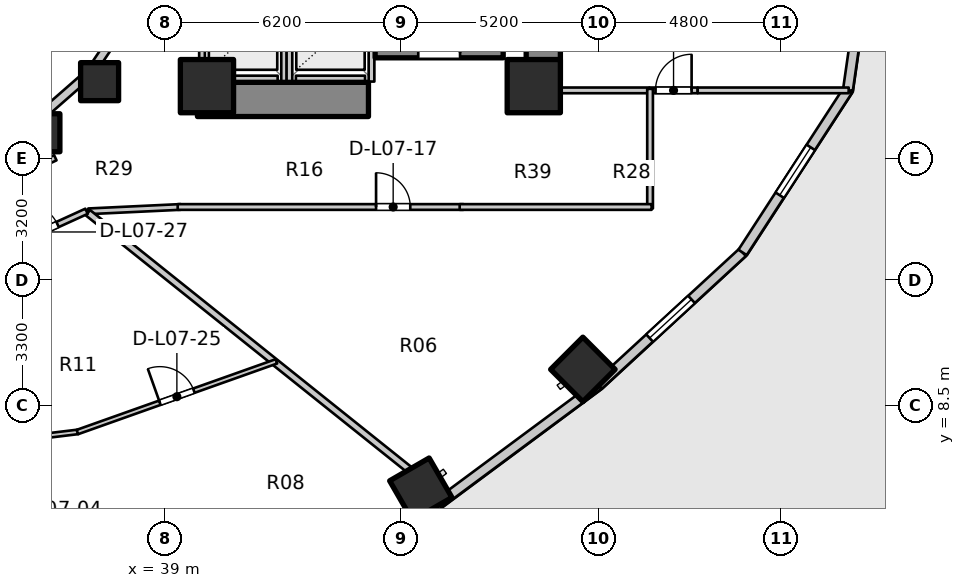
"""IFC4 building model, lengths in metres.
Left out: names, types, materials, properties, quantities, classifications, styles, units other than length and angle.
Written with IfcOpenShell. Run it as: python <this file> out.ifc"""

import sys

from ifc_helpers import new_model, si_unit, direction, frame, frame_2d, origin, origin_2d, place, context, subcontext, project, spatial, rectangle, extrude, element, fill, save


model = new_model("IFC4")
c1 = context("Model", 3, precision=1e-05, world=origin(), true_north=direction((0.0, 1.0)))
c2 = subcontext(c1, "Body", "Model", "MODEL_VIEW")
j1 = project(units=[si_unit("LENGTHUNIT", "METRE"), si_unit("PLANEANGLEUNIT", "RADIAN")], contexts=[c1])
p1 = place(None, origin())
s1 = spatial("IfcSite", under=j1, at=p1, CompositionType="ELEMENT")
p2 = place(p1, origin())
s2 = spatial("IfcBuilding", under=s1, at=p2, CompositionType="ELEMENT")
p3 = place(p2, frame((0.0, 0.0, 27.6)))
s3 = spatial("IfcBuildingStorey", under=s2, at=p3, CompositionType="ELEMENT", Elevation=27.6)
p4 = place(p3, frame((48.95, 17.05, 0.0), z_axis=(0.0, 0.0, 1.0), x_axis=(0.0, 1.0, 0.0)))
e1 = element("IfcWall", 1, at=p4, inside=s3, PredefinedType="SHEAR", context=c2, shape_type="SweptSolid", body=[
    extrude(rectangle(XDim=12.8, YDim=0.9, at=frame_2d((6.4, 0.0))), origin(), (0.0, 0.0, 1.0), 3.1),
])
p5 = place(p3, frame((39.85, 16.55, 0.0), z_axis=(0.0, 0.0, 1.0), x_axis=(1.0, 0.0, 0.0)))
e2 = element("IfcWall", 2, at=p5, inside=s3, PredefinedType="SHEAR", context=c2, shape_type="SweptSolid", body=[
    extrude(rectangle(XDim=4.5, YDim=0.9, at=frame_2d((2.25, 0.0))), origin(), (0.0, 0.0, 1.0), 3.1),
])
p6 = place(p3, frame((44.525, 17.77, 0.0), z_axis=(0.0, 0.0, 1.0), x_axis=(1.0, 0.0, 0.0)))
e3 = element("IfcWall", 3, at=p6, inside=s3, PredefinedType="SOLIDWALL", context=c2, shape_type="SweptSolid", body=[
    extrude(rectangle(XDim=3.37, YDim=0.25, at=frame_2d((1.685, 0.0))), origin(), (0.0, 0.0, 1.0), 3.1),
])
p7 = place(p6, frame((1.135, 0.0, 0.0)))
e4 = element("IfcOpeningElement", 4, at=p7, cuts=e3, PredefinedType="OPENING", context=c2, shape_type="SweptSolid", body=[
    extrude(rectangle(XDim=1.1, YDim=2.1, at=frame_2d((0.55, 1.05))), frame((0.0, 0.135, 0.0), z_axis=(0.0, -1.0, 0.0), x_axis=(1.0, 0.0, 0.0)), (0.0, 0.0, 1.0), 0.27),
])
for number, where, z_axis, x_axis in (
    (5, (40.1, 16.9, 0.0), (0.0, 0.0, 1.0), (1.0, 0.0, 0.0)),
    (6, (48.7, 16.9, 0.0), (0.0, 0.0, 1.0), (1.0, 0.0, 0.0)),
):
    element("IfcColumn", number, at=place(p3, frame(where, z_axis=z_axis, x_axis=x_axis)), inside=s3, PredefinedType="COLUMN", context=c2, shape_type="SweptSolid", body=[
        extrude(rectangle(XDim=1.4, YDim=1.4, at=origin_2d()), origin(), (0.0, 0.0, 1.0), 3.1),
    ])
p8 = place(p3, frame((35.73, 15.673, 0.0), z_axis=(0.0, 0.0, 1.0), x_axis=(1.0, 0.0, 0.0)))
e7 = element("IfcColumn", 7, at=p8, inside=s3, PredefinedType="COLUMN", context=c2, shape_type="SweptSolid", body=[
    extrude(rectangle(XDim=1.0, YDim=1.0, at=origin_2d()), origin(), (0.0, 0.0, 1.0), 3.1),
])
p9 = place(p3, frame((45.727, 6.296, 0.0), z_axis=(0.0, 0.0, 1.0), x_axis=(0.5, -0.866025403784, 0.0)))
e8 = element("IfcColumn", 8, at=p9, inside=s3, PredefinedType="COLUMN", context=c2, shape_type="SweptSolid", body=[
    extrude(rectangle(XDim=1.2, YDim=1.2, at=origin_2d()), origin(), (0.0, 0.0, 1.0), 3.1),
])
p10 = place(p3, frame((37.275, 17.018, 0.0), z_axis=(0.0, 0.0, 1.0), x_axis=(1.0, 0.0, 0.0)))
e9 = element("IfcColumn", 9, at=p10, inside=s3, PredefinedType="COLUMN", context=c2, shape_type="SweptSolid", body=[
    extrude(rectangle(XDim=1.0, YDim=1.0, at=origin_2d()), origin(), (0.0, 0.0, 1.0), 3.1),
])
p11 = place(p3, frame((49.992, 9.446, 0.0), z_axis=(0.0, 0.0, 1.0), x_axis=(0.707106781187, -0.707106781187, 0.0)))
e10 = element("IfcColumn", 10, at=p11, inside=s3, PredefinedType="COLUMN", context=c2, shape_type="SweptSolid", body=[
    extrude(rectangle(XDim=1.2, YDim=1.2, at=origin_2d()), origin(), (0.0, 0.0, 1.0), 3.1),
])
p12 = place(p3, frame((35.56, 15.968, 0.0), z_axis=(0.0, 0.0, 1.0), x_axis=(0.752576694707, 0.658504607869, 0.0)))
e11 = element("IfcWall", 11, at=p12, inside=s3, PredefinedType="STANDARD", context=c2, shape_type="SweptSolid", body=[
    extrude(rectangle(XDim=1.959, YDim=0.23, at=frame_2d((0.98, 0.0))), origin(), (0.0, 0.0, 1.0), 2.16),
])
p13 = place(p3, frame((37.035, 17.258, 0.0), z_axis=(0.0, 0.0, 1.0), x_axis=(0.558197800898, 0.829707909492, 0.0)))
e12 = element("IfcWall", 12, at=p13, inside=s3, PredefinedType="STANDARD", context=c2, shape_type="SweptSolid", body=[
    extrude(rectangle(XDim=2.027, YDim=0.23, at=frame_2d((1.013, 0.0))), origin(), (0.0, 0.0, 1.0), 2.16),
])
p14 = place(p3, frame((40.332, 3.364, 0.0), z_axis=(0.0, 0.0, 1.0), x_axis=(0.919612132394, 0.39282760335, 0.0)))
e13 = element("IfcWall", 13, at=p14, inside=s3, PredefinedType="STANDARD", context=c2, shape_type="SweptSolid", body=[
    extrude(rectangle(XDim=6.209, YDim=0.26, at=frame_2d((3.105, 0.0))), origin(), (0.0, 0.0, 1.0), 2.85),
])
p15 = place(p14, frame((2.355, 0.0, 0.75)))
e14 = element("IfcOpeningElement", 14, at=p15, cuts=e13, PredefinedType="OPENING", context=c2, shape_type="SweptSolid", body=[
    extrude(rectangle(XDim=1.5, YDim=1.6, at=frame_2d((0.75, 0.8))), frame((0.0, 0.14, 0.0), z_axis=(0.0, -1.0, 0.0), x_axis=(1.0, 0.0, 0.0)), (0.0, 0.0, 1.0), 0.28),
])
p16 = place(p3, frame((46.042, 5.803, 0.0), z_axis=(0.0, 0.0, 1.0), x_axis=(0.803477531792, 0.595335078679, 0.0)))
e15 = element("IfcWall", 15, at=p16, inside=s3, PredefinedType="STANDARD", context=c2, shape_type="SweptSolid", body=[
    extrude(rectangle(XDim=5.43, YDim=0.26, at=frame_2d((2.715, 0.0))), origin(), (0.0, 0.0, 1.0), 2.85),
])
p17 = place(p3, frame((50.405, 9.035, 0.0), z_axis=(0.0, 0.0, 1.0), x_axis=(0.735655109293, 0.67735630223, 0.0)))
e16 = element("IfcWall", 16, at=p17, inside=s3, PredefinedType="STANDARD", context=c2, shape_type="SweptSolid", body=[
    extrude(rectangle(XDim=5.151, YDim=0.26, at=frame_2d((2.575, 0.0))), origin(), (0.0, 0.0, 1.0), 2.85),
])
p18 = place(p17, frame((1.825, 0.0, 0.75)))
e17 = element("IfcOpeningElement", 17, at=p18, cuts=e16, PredefinedType="OPENING", context=c2, shape_type="SweptSolid", body=[
    extrude(rectangle(XDim=1.5, YDim=1.6, at=frame_2d((0.75, 0.8))), frame((0.0, 0.14, 0.0), z_axis=(0.0, -1.0, 0.0), x_axis=(1.0, 0.0, 0.0)), (0.0, 0.0, 1.0), 0.28),
])
p19 = place(p3, frame((54.194, 12.524, 0.0), z_axis=(0.0, 0.0, 1.0), x_axis=(0.544578722263, 0.838709732421, 0.0)))
e18 = element("IfcWall", 18, at=p19, inside=s3, PredefinedType="STANDARD", context=c2, shape_type="SweptSolid", body=[
    extrude(rectangle(XDim=5.092, YDim=0.26, at=frame_2d((2.546, 0.0))), origin(), (0.0, 0.0, 1.0), 2.85),
])
p20 = place(p19, frame((1.796, 0.0, 0.75)))
e19 = element("IfcOpeningElement", 19, at=p20, cuts=e18, PredefinedType="OPENING", context=c2, shape_type="SweptSolid", body=[
    extrude(rectangle(XDim=1.5, YDim=1.6, at=frame_2d((0.75, 0.8))), frame((0.0, 0.14, 0.0), z_axis=(0.0, -1.0, 0.0), x_axis=(1.0, 0.0, 0.0)), (0.0, 0.0, 1.0), 0.28),
])
p21 = place(p3, frame((56.967, 16.795, 0.0), z_axis=(0.0, 0.0, 1.0), x_axis=(0.142528001686, 0.989790770181, 0.0)))
e20 = element("IfcWall", 20, at=p21, inside=s3, PredefinedType="STANDARD", context=c2, shape_type="SweptSolid", body=[
    extrude(rectangle(XDim=6.269, YDim=0.26, at=frame_2d((3.135, 0.0))), origin(), (0.0, 0.0, 1.0), 2.85),
])
p22 = place(p21, frame((1.935, 0.0, 0.75)))
e21 = element("IfcOpeningElement", 21, at=p22, cuts=e20, PredefinedType="OPENING", context=c2, shape_type="SweptSolid", body=[
    extrude(rectangle(XDim=2.4, YDim=1.7, at=frame_2d((1.2, 0.85))), frame((0.0, 0.14, 0.0), z_axis=(0.0, -1.0, 0.0), x_axis=(1.0, 0.0, 0.0)), (0.0, 0.0, 1.0), 0.28),
])
p23 = place(p3, frame((40.14, 17.1, 0.0), z_axis=(0.0, 0.0, 1.0), x_axis=(1.0, 0.0, 0.0)))
e22 = element("IfcWall", 22, at=p23, inside=s3, PredefinedType="SOLIDWALL", context=c2, shape_type="SweptSolid", body=[
    extrude(rectangle(XDim=1.82, YDim=0.15, at=frame_2d((0.91, 0.0))), origin(), (0.0, 0.0, 1.0), 2.12),
])
p24 = place(p3, frame((39.97, 17.02, 0.0), z_axis=(0.0, 0.0, 1.0), x_axis=(0.0, 1.0, 0.0)))
e23 = element("IfcWall", 23, at=p24, inside=s3, PredefinedType="SOLIDWALL", context=c2, shape_type="SweptSolid", body=[
    extrude(rectangle(XDim=2.22, YDim=0.15, at=frame_2d((1.11, 0.0))), origin(), (0.0, 0.0, 1.0), 2.12),
])
p25 = place(p3, frame((42.13, 17.02, 0.0), z_axis=(0.0, 0.0, 1.0), x_axis=(0.0, 1.0, 0.0)))
e24 = element("IfcWall", 24, at=p25, inside=s3, PredefinedType="SOLIDWALL", context=c2, shape_type="SweptSolid", body=[
    extrude(rectangle(XDim=2.22, YDim=0.15, at=frame_2d((1.11, 0.0))), origin(), (0.0, 0.0, 1.0), 2.855),
])
p26 = place(p3, frame((42.44, 17.1, 0.0), z_axis=(0.0, 0.0, 1.0), x_axis=(1.0, 0.0, 0.0)))
e25 = element("IfcWall", 25, at=p26, inside=s3, PredefinedType="SOLIDWALL", context=c2, shape_type="SweptSolid", body=[
    extrude(rectangle(XDim=1.82, YDim=0.15, at=frame_2d((0.91, 0.0))), origin(), (0.0, 0.0, 1.0), 2.855),
])
p27 = place(p3, frame((42.27, 17.02, 0.0), z_axis=(0.0, 0.0, 1.0), x_axis=(0.0, 1.0, 0.0)))
e26 = element("IfcWall", 26, at=p27, inside=s3, PredefinedType="SOLIDWALL", context=c2, shape_type="SweptSolid", body=[
    extrude(rectangle(XDim=2.22, YDim=0.15, at=frame_2d((1.11, 0.0))), origin(), (0.0, 0.0, 1.0), 2.855),
])
p28 = place(p3, frame((44.43, 17.02, 0.0), z_axis=(0.0, 0.0, 1.0), x_axis=(0.0, 1.0, 0.0)))
e27 = element("IfcWall", 27, at=p28, inside=s3, PredefinedType="SOLIDWALL", context=c2, shape_type="SweptSolid", body=[
    extrude(rectangle(XDim=2.22, YDim=0.15, at=frame_2d((1.11, 0.0))), origin(), (0.0, 0.0, 1.0), 2.12),
])
p29 = place(p3, frame((34.127, 14.094, 0.0), z_axis=(0.0, 0.0, 1.0), x_axis=(0.906943449489, 0.421252393975, 0.0)))
e28 = element("IfcWall", 28, at=p29, inside=s3, PredefinedType="PARTITIONING", context=c2, shape_type="SweptSolid", body=[
    extrude(rectangle(XDim=2.186, YDim=0.15, at=frame_2d((1.093, 0.0))), origin(), (0.0, 0.0, 1.0), 2.237),
])
p30 = place(p3, frame((48.95, 16.788, 0.0), z_axis=(0.0, 0.0, 1.0), x_axis=(1.0, 0.0, 0.0)))
e29 = element("IfcWall", 29, at=p30, inside=s3, PredefinedType="PARTITIONING", context=c2, shape_type="SweptSolid", body=[
    extrude(rectangle(XDim=2.793, YDim=0.15, at=frame_2d((1.396, 0.0))), origin(), (0.0, 0.0, 1.0), 2.069),
])
p31 = place(p3, frame((51.743, 16.788, 0.0), z_axis=(0.0, 0.0, 1.0), x_axis=(1.0, 0.0, 0.0)))
e30 = element("IfcWall", 30, at=p31, inside=s3, PredefinedType="PARTITIONING", context=c2, shape_type="SweptSolid", body=[
    extrude(rectangle(XDim=1.27, YDim=0.15, at=frame_2d((0.635, 0.0))), origin(), (0.0, 0.0, 1.0), 2.855),
])
p32 = place(p31, frame((0.16, 0.0, 0.0)))
e31 = element("IfcOpeningElement", 31, at=p32, cuts=e30, PredefinedType="OPENING", context=c2, shape_type="SweptSolid", body=[
    extrude(rectangle(XDim=0.95, YDim=2.1, at=frame_2d((0.475, 1.05))), frame((0.0, 0.085, 0.0), z_axis=(0.0, -1.0, 0.0), x_axis=(1.0, 0.0, 0.0)), (0.0, 0.0, 1.0), 0.17),
])
p33 = place(p3, frame((53.013, 16.788, 0.0), z_axis=(0.0, 0.0, 1.0), x_axis=(1.0, 0.0, 0.0)))
e32 = element("IfcWall", 32, at=p33, inside=s3, PredefinedType="PARTITIONING", context=c2, shape_type="SweptSolid", body=[
    extrude(rectangle(XDim=3.973, YDim=0.15, at=frame_2d((1.987, 0.0))), origin(), (0.0, 0.0, 1.0), 2.855),
])
p34 = place(p3, frame((51.76, 13.68, 0.0), z_axis=(0.0, 0.0, 1.0), x_axis=(0.0, 1.0, 0.0)))
e33 = element("IfcWall", 33, at=p34, inside=s3, PredefinedType="PARTITIONING", context=c2, shape_type="SweptSolid", body=[
    extrude(rectangle(XDim=3.148, YDim=0.15, at=frame_2d((1.574, 0.0))), origin(), (0.0, 0.0, 1.0), 2.855),
])
p35 = place(p3, frame((36.98, 13.606, 0.0), z_axis=(0.0, 0.0, 1.0), x_axis=(0.998877427952, 0.047369651964, 0.0)))
e34 = element("IfcWall", 34, at=p35, inside=s3, PredefinedType="PARTITIONING", context=c2, shape_type="SweptSolid", body=[
    extrude(rectangle(XDim=2.433, YDim=0.15, at=frame_2d((1.216, 0.0))), origin(), (0.0, 0.0, 1.0), 2.237),
])
p36 = place(p3, frame((39.33, 13.72, 0.0), z_axis=(0.0, 0.0, 1.0), x_axis=(1.0, 0.0, 0.0)))
e35 = element("IfcWall", 35, at=p36, inside=s3, PredefinedType="PARTITIONING", context=c2, shape_type="SweptSolid", body=[
    extrude(rectangle(XDim=7.52, YDim=0.15, at=frame_2d((3.76, 0.0))), origin(), (0.0, 0.0, 1.0), 2.237),
])
p37 = place(p36, frame((5.22, 0.0, 0.0)))
e36 = element("IfcOpeningElement", 36, at=p37, cuts=e35, PredefinedType="OPENING", context=c2, shape_type="SweptSolid", body=[
    extrude(rectangle(XDim=0.9, YDim=2.1, at=frame_2d((0.45, 1.05))), frame((0.0, 0.085, 0.0), z_axis=(0.0, -1.0, 0.0), x_axis=(1.0, 0.0, 0.0)), (0.0, 0.0, 1.0), 0.17),
])
p38 = place(p3, frame((46.75, 13.72, 0.0), z_axis=(0.0, 0.0, 1.0), x_axis=(1.0, 0.0, 0.0)))
e37 = element("IfcWall", 37, at=p38, inside=s3, PredefinedType="PARTITIONING", context=c2, shape_type="SweptSolid", body=[
    extrude(rectangle(XDim=5.05, YDim=0.15, at=frame_2d((2.525, 0.0))), origin(), (0.0, 0.0, 1.0), 2.069),
])
p39 = place(p3, frame((36.968, 13.569, 0.0), z_axis=(0.0, 0.0, 1.0), x_axis=(0.781055486744, -0.624461629428, 0.0)))
e38 = element("IfcWall", 38, at=p39, inside=s3, PredefinedType="PARTITIONING", context=c2, shape_type="SweptSolid", body=[
    extrude(rectangle(XDim=10.843, YDim=0.18, at=frame_2d((5.422, 0.0))), origin(), (0.0, 0.0, 1.0), 2.237),
])
p40 = place(p3, frame((31.95, 7.225, 0.0), z_axis=(0.0, 0.0, 1.0), x_axis=(0.992699076447, 0.120617343785, 0.0)))
e39 = element("IfcWall", 39, at=p40, inside=s3, PredefinedType="MOVABLE", context=c2, shape_type="SweptSolid", body=[
    extrude(rectangle(XDim=4.793, YDim=0.12, at=frame_2d((2.396, 0.0))), origin(), (0.0, 0.0, 1.0), 2.237),
])
p41 = place(p3, frame((36.689, 7.798, 0.0), z_axis=(0.0, 0.0, 1.0), x_axis=(0.942369240096, 0.334574678243, 0.0)))
e40 = element("IfcWall", 40, at=p41, inside=s3, PredefinedType="MOVABLE", context=c2, shape_type="SweptSolid", body=[
    extrude(rectangle(XDim=5.559, YDim=0.12, at=frame_2d((2.779, 0.0))), origin(), (0.0, 0.0, 1.0), 2.237),
])
p42 = place(p41, frame((2.304, 0.0, 0.0)))
e41 = element("IfcOpeningElement", 41, at=p42, cuts=e40, PredefinedType="OPENING", context=c2, shape_type="SweptSolid", body=[
    extrude(rectangle(XDim=0.95, YDim=2.1, at=frame_2d((0.475, 1.05))), frame((0.0, 0.07, 0.0), z_axis=(0.0, -1.0, 0.0), x_axis=(1.0, 0.0, 0.0)), (0.0, 0.0, 1.0), 0.14),
])
p43 = place(p3, frame((34.543, 12.518, 0.0), z_axis=(0.0, 0.0, 1.0), x_axis=(0.909747571199, 0.415161843982, 0.0)))
e42 = element("IfcWall", 42, at=p43, inside=s3, PredefinedType="PARTITIONING", context=c2, shape_type="SweptSolid", body=[
    extrude(rectangle(XDim=2.625, YDim=0.15, at=frame_2d((1.312, 0.0))), origin(), (0.0, 0.0, 1.0), 2.237),
])
p44 = place(p43, frame((0.838, 0.0, 0.0)))
e43 = element("IfcOpeningElement", 43, at=p44, cuts=e42, PredefinedType="OPENING", context=c2, shape_type="SweptSolid", body=[
    extrude(rectangle(XDim=0.95, YDim=2.1, at=frame_2d((0.475, 1.05))), frame((0.0, 0.085, 0.0), z_axis=(0.0, -1.0, 0.0), x_axis=(1.0, 0.0, 0.0)), (0.0, 0.0, 1.0), 0.17),
])
p45 = place(p18, origin())
e44 = element("IfcWindow", 44, at=p45, inside=s3, PartitioningType="SINGLE_PANEL", PredefinedType="WINDOW", context=c2, shape_type="SweptSolid", body=[
    extrude(rectangle(XDim=1.5, YDim=1.6, at=frame_2d((0.75, 0.8))), frame((0.0, 0.03, 0.0), z_axis=(0.0, -1.0, 0.0), x_axis=(1.0, 0.0, 0.0)), (0.0, 0.0, 1.0), 0.06),
])
fill(e17, e44)
p46 = place(p20, origin())
e45 = element("IfcWindow", 45, at=p46, inside=s3, PartitioningType="SINGLE_PANEL", PredefinedType="WINDOW", context=c2, shape_type="SweptSolid", body=[
    extrude(rectangle(XDim=1.5, YDim=1.6, at=frame_2d((0.75, 0.8))), frame((0.0, 0.03, 0.0), z_axis=(0.0, -1.0, 0.0), x_axis=(1.0, 0.0, 0.0)), (0.0, 0.0, 1.0), 0.06),
])
fill(e19, e45)
p47 = place(p7, origin())
e46 = element("IfcDoor", 46, at=p47, inside=s3, OperationType="SINGLE_SWING_RIGHT", PredefinedType="DOOR", context=c2, shape_type="SweptSolid", body=[
    extrude(rectangle(XDim=1.1, YDim=2.1, at=frame_2d((0.55, 1.05))), frame((0.0, 0.025, 0.0), z_axis=(0.0, -1.0, 0.0), x_axis=(1.0, 0.0, 0.0)), (0.0, 0.0, 1.0), 0.05),
])
fill(e4, e46)
p48 = place(p32, origin())
e47 = element("IfcDoor", 47, at=p48, inside=s3, OperationType="SINGLE_SWING_RIGHT", PredefinedType="DOOR", context=c2, shape_type="SweptSolid", body=[
    extrude(rectangle(XDim=0.95, YDim=2.1, at=frame_2d((0.475, 1.05))), frame((0.0, 0.025, 0.0), z_axis=(0.0, -1.0, 0.0), x_axis=(1.0, 0.0, 0.0)), (0.0, 0.0, 1.0), 0.05),
])
fill(e31, e47)
p49 = place(p37, origin())
e48 = element("IfcDoor", 48, at=p49, inside=s3, OperationType="SINGLE_SWING_LEFT", PredefinedType="DOOR", context=c2, shape_type="SweptSolid", body=[
    extrude(rectangle(XDim=0.9, YDim=2.1, at=frame_2d((0.45, 1.05))), frame((0.0, 0.025, 0.0), z_axis=(0.0, -1.0, 0.0), x_axis=(1.0, 0.0, 0.0)), (0.0, 0.0, 1.0), 0.05),
])
fill(e36, e48)
p50 = place(p42, origin())
e49 = element("IfcDoor", 49, at=p50, inside=s3, OperationType="SINGLE_SWING_LEFT", PredefinedType="DOOR", context=c2, shape_type="SweptSolid", body=[
    extrude(rectangle(XDim=0.95, YDim=2.1, at=frame_2d((0.475, 1.05))), frame((0.0, 0.025, 0.0), z_axis=(0.0, -1.0, 0.0), x_axis=(1.0, 0.0, 0.0)), (0.0, 0.0, 1.0), 0.05),
])
fill(e41, e49)
p51 = place(p44, origin())
e50 = element("IfcDoor", 50, at=p51, inside=s3, OperationType="SINGLE_SWING_LEFT", PredefinedType="DOOR", context=c2, shape_type="SweptSolid", body=[
    extrude(rectangle(XDim=0.95, YDim=2.1, at=frame_2d((0.475, 1.05))), frame((0.0, 0.025, 0.0), z_axis=(0.0, -1.0, 0.0), x_axis=(1.0, 0.0, 0.0)), (0.0, 0.0, 1.0), 0.05),
])
fill(e43, e50)
save(model, sys.argv[1])
